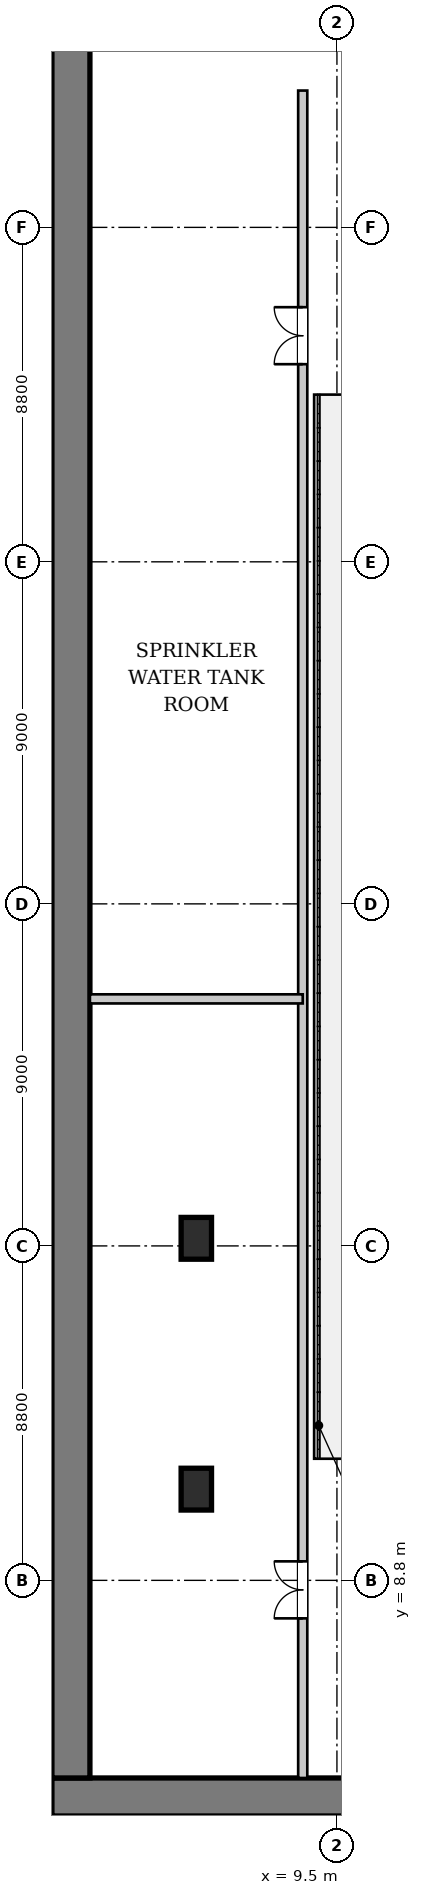
"""IFC4 building model, lengths in metres.
Left out: names, types, materials, properties, quantities, classifications, styles, units other than length and angle.
Written with IfcOpenShell. Run it as: python <this file> out.ifc"""

import sys

from ifc_helpers import new_model, si_unit, direction, frame, frame_2d, origin, origin_2d, place, context, subcontext, project, spatial, rectangle, extrude, source, transform, mapped, element, fill, save


model = new_model("IFC4")
c1 = context("Model", 3, precision=1e-05, world=origin(), true_north=direction((0.0, 1.0)))
c2 = subcontext(c1, "Body", "Model", "MODEL_VIEW")
j1 = project(units=[si_unit("LENGTHUNIT", "METRE"), si_unit("PLANEANGLEUNIT", "RADIAN")], contexts=[c1])
p1 = place(None, origin())
s1 = spatial("IfcSite", under=j1, at=p1, CompositionType="ELEMENT")
p2 = place(p1, origin())
s2 = spatial("IfcBuilding", under=s1, at=p2, CompositionType="ELEMENT")
p3 = place(p2, frame((0.0, 0.0, -9.6)))
s3 = spatial("IfcBuildingStorey", under=s2, at=p3, CompositionType="ELEMENT", Elevation=-9.6)
p4 = place(p3, frame((2.0, 3.1, 0.0), z_axis=(0.0, 0.0, 1.0), x_axis=(1.0, 0.0, 0.0)))
e1 = element("IfcWall", 1, at=p4, inside=s3, PredefinedType="SOLIDWALL", context=c2, shape_type="SweptSolid", body=[
    extrude(rectangle(XDim=72.0, YDim=1.0, at=frame_2d((36.0, 0.0))), origin(), (0.0, 0.0, 1.0), 4.45),
])
p5 = place(p3, frame((2.5, 3.6, 0.0), z_axis=(0.0, 0.0, 1.0), x_axis=(0.0, 1.0, 0.0)))
e2 = element("IfcWall", 2, at=p5, inside=s3, PredefinedType="SOLIDWALL", context=c2, shape_type="SweptSolid", body=[
    extrude(rectangle(XDim=46.0, YDim=1.0, at=frame_2d((23.0, 0.0))), origin(), (0.0, 0.0, 1.0), 4.45),
])
m1 = source(origin(), c2, "Body", "SweptSolid", [
    extrude(rectangle(XDim=0.8, YDim=1.1, at=origin_2d()), origin(), (0.0, 0.0, 1.0), 4.635),
])
for number, where, z_axis, x_axis in (
    (3, (5.8, 11.2, 0.0), (0.0, 0.0, 1.0), (1.0, 0.0, 0.0)),
    (4, (5.8, 17.8, 0.0), (0.0, 0.0, 1.0), (1.0, 0.0, 0.0)),
):
    element("IfcColumn", number, at=place(p3, frame(where, z_axis=z_axis, x_axis=x_axis)), inside=s3, PredefinedType="COLUMN", context=c2, shape_type="MappedRepresentation", body=[
        mapped(m1, transform((0.0, 0.0, 0.0), x_axis=(1.0, 0.0, 0.0), y_axis=(0.0, 1.0, 0.0), z_axis=(0.0, 0.0, 1.0), scale=1.0)),
    ])
p6 = place(p3, frame((8.6, 3.6, 0.0), z_axis=(0.0, 0.0, 1.0), x_axis=(0.0, 1.0, 0.0)))
e5 = element("IfcWall", 5, at=p6, inside=s3, PredefinedType="PARTITIONING", context=c2, shape_type="SweptSolid", body=[
    extrude(rectangle(XDim=44.4, YDim=0.24, at=frame_2d((22.2, 0.0))), origin(), (0.0, 0.0, 1.0), 4.45),
])
p7 = place(p6, frame((4.2, 0.0, 0.0)))
e6 = element("IfcOpeningElement", 6, at=p7, cuts=e5, PredefinedType="OPENING", context=c2, shape_type="SweptSolid", body=[
    extrude(rectangle(XDim=1.5, YDim=2.25, at=frame_2d((0.75, 1.125))), frame((0.0, 0.13, 0.0), z_axis=(0.0, -1.0, 0.0), x_axis=(1.0, 0.0, 0.0)), (0.0, 0.0, 1.0), 0.26),
])
p8 = place(p6, frame((37.2, 0.0, 0.0)))
e7 = element("IfcOpeningElement", 7, at=p8, cuts=e5, PredefinedType="OPENING", context=c2, shape_type="SweptSolid", body=[
    extrude(rectangle(XDim=1.5, YDim=2.25, at=frame_2d((0.75, 1.125))), frame((0.0, 0.13, 0.0), z_axis=(0.0, -1.0, 0.0), x_axis=(1.0, 0.0, 0.0)), (0.0, 0.0, 1.0), 0.26),
])
p9 = place(p3, frame((3.0, 24.1, 0.0), z_axis=(0.0, 0.0, 1.0), x_axis=(1.0, 0.0, 0.0)))
e8 = element("IfcWall", 8, at=p9, inside=s3, PredefinedType="PARTITIONING", context=c2, shape_type="SweptSolid", body=[
    extrude(rectangle(XDim=5.6, YDim=0.24, at=frame_2d((2.8, 0.0))), origin(), (0.0, 0.0, 1.0), 4.45),
])
m2 = source(origin(), c2, "Body", "SweptSolid", [
    extrude(rectangle(XDim=1.5, YDim=2.25, at=frame_2d((0.75, 1.125))), frame((0.0, 0.025, 0.0), z_axis=(0.0, -1.0, 0.0), x_axis=(1.0, 0.0, 0.0)), (0.0, 0.0, 1.0), 0.05),
])
p10 = place(p7, origin())
e9 = element("IfcDoor", 9, at=p10, inside=s3, OperationType="DOUBLE_DOOR_SINGLE_SWING", PredefinedType="DOOR", context=c2, shape_type="MappedRepresentation", body=[
    mapped(m2, transform((0.0, 0.0, 0.0), x_axis=(1.0, 0.0, 0.0), y_axis=(0.0, 1.0, 0.0), z_axis=(0.0, 0.0, 1.0), scale=1.0)),
])
fill(e6, e9)
p11 = place(p8, origin())
e10 = element("IfcDoor", 10, at=p11, inside=s3, OperationType="DOUBLE_DOOR_SINGLE_SWING", PredefinedType="DOOR", context=c2, shape_type="MappedRepresentation", body=[
    mapped(m2, transform((0.0, 0.0, 0.0), x_axis=(1.0, 0.0, 0.0), y_axis=(0.0, 1.0, 0.0), z_axis=(0.0, 0.0, 1.0), scale=1.0)),
])
fill(e7, e10)
save(model, sys.argv[1])
